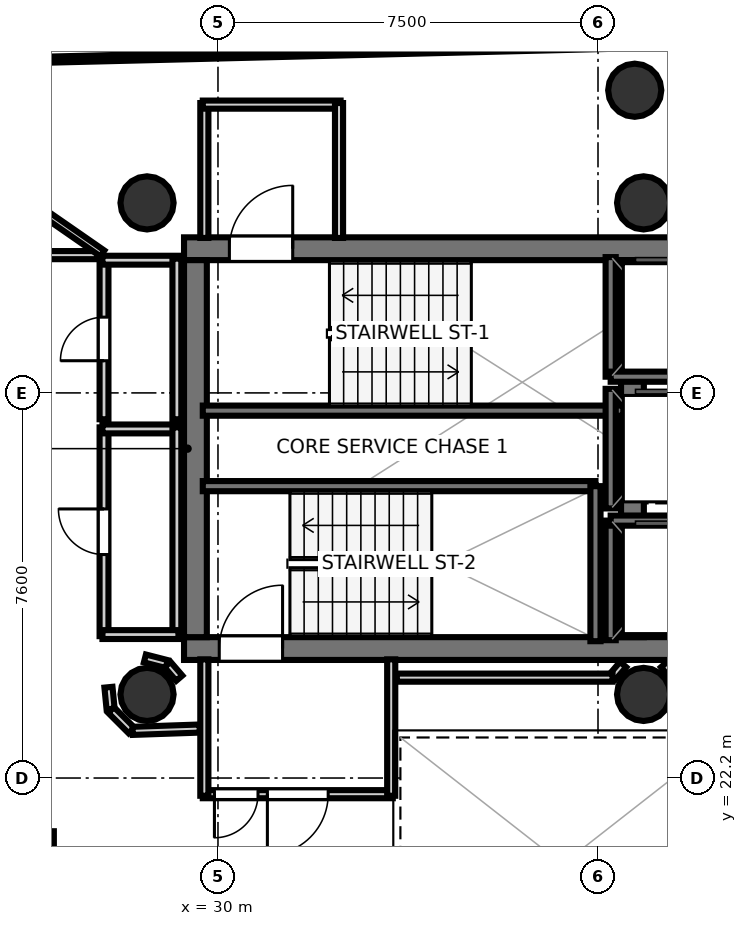
"""IFC4 building model, lengths in metres.
Left out: names, types, materials, properties, quantities, classifications, styles, units other than length and angle.
Written with IfcOpenShell. Run it as: python <this file> out.ifc"""

import sys

from ifc_helpers import new_model, si_unit, direction, frame, frame_2d, origin, origin_2d, place, context, subcontext, project, spatial, rectangle, hollow_circle, extrude, element, fill, save


model = new_model("IFC4")
c1 = context("Model", 3, precision=1e-05, world=origin(), true_north=direction((0.0, 1.0)))
c2 = subcontext(c1, "Body", "Model", "MODEL_VIEW")
j1 = project(units=[si_unit("LENGTHUNIT", "METRE"), si_unit("PLANEANGLEUNIT", "RADIAN")], contexts=[c1])
p1 = place(None, origin())
s1 = spatial("IfcSite", under=j1, at=p1, CompositionType="ELEMENT")
p2 = place(p1, origin())
s2 = spatial("IfcBuilding", under=s1, at=p2, CompositionType="ELEMENT")
p3 = place(p2, frame((0.0, 0.0, 257.5)))
s3 = spatial("IfcBuildingStorey", under=s2, at=p3, CompositionType="ELEMENT", Elevation=257.5)
p4 = place(p3, frame((29.33, 32.645, 0.0), z_axis=(0.0, 0.0, 1.0), x_axis=(1.0, 0.0, 0.0)))
e1 = element("IfcWall", 1, at=p4, inside=s3, PredefinedType="SHEAR", context=c2, shape_type="SweptSolid", body=[
    extrude(rectangle(XDim=10.52, YDim=0.45, at=frame_2d((5.26, 0.0))), origin(), (0.0, 0.0, 1.0), 3.52),
])
p5 = place(p4, frame((0.895, 0.0, 0.0)))
e2 = element("IfcOpeningElement", 2, at=p5, cuts=e1, PredefinedType="OPENING", context=c2, shape_type="SweptSolid", body=[
    extrude(rectangle(XDim=1.25, YDim=2.15, at=frame_2d((0.625, 1.075))), frame((0.0, 0.235, 0.0), z_axis=(0.0, -1.0, 0.0), x_axis=(1.0, 0.0, 0.0)), (0.0, 0.0, 1.0), 0.47),
])
p6 = place(p3, frame((29.33, 24.755, 0.0), z_axis=(0.0, 0.0, 1.0), x_axis=(1.0, 0.0, 0.0)))
e3 = element("IfcWall", 3, at=p6, inside=s3, PredefinedType="SHEAR", context=c2, shape_type="SweptSolid", body=[
    extrude(rectangle(XDim=10.52, YDim=0.45, at=frame_2d((5.26, 0.0))), origin(), (0.0, 0.0, 1.0), 3.52),
])
p7 = place(p6, frame((0.695, 0.0, 0.0)))
e4 = element("IfcOpeningElement", 4, at=p7, cuts=e3, PredefinedType="OPENING", context=c2, shape_type="SweptSolid", body=[
    extrude(rectangle(XDim=1.25, YDim=2.15, at=frame_2d((0.625, 1.075))), frame((0.0, 0.235, 0.0), z_axis=(0.0, -1.0, 0.0), x_axis=(1.0, 0.0, 0.0)), (0.0, 0.0, 1.0), 0.47),
])
for number, where, z_axis, x_axis in (
    (5, (29.555, 24.98, 0.0), (0.0, 0.0, 1.0), (0.0, 1.0, 0.0)),
    (6, (38.18, 24.98, 0.0), (0.0, 0.0, 1.0), (0.0, 1.0, 0.0)),
):
    element("IfcWall", number, at=place(p3, frame(where, z_axis=z_axis, x_axis=x_axis)), inside=s3, PredefinedType="SHEAR", context=c2, shape_type="SweptSolid", body=[
        extrude(rectangle(XDim=7.44, YDim=0.45, at=frame_2d((3.72, 0.0))), origin(), (0.0, 0.0, 1.0), 3.52),
    ])
for number, where, z_axis, x_axis in (
    (7, (28.6, 33.55, 0.0), (0.0, 0.0, 1.0), (1.0, 0.0, 0.0)),
    (8, (28.6, 23.85, 0.0), (0.0, 0.0, 1.0), (1.0, 0.0, 0.0)),
    (9, (38.4, 33.55, 0.0), (0.0, 0.0, 1.0), (1.0, 0.0, 0.0)),
    (10, (38.4, 23.85, 0.0), (0.0, 0.0, 1.0), (1.0, 0.0, 0.0)),
    (11, (38.225, 35.773, 0.0), (0.0, 0.0, 1.0), (1.0, 0.0, 0.0)),
):
    element("IfcColumn", number, at=place(p3, frame(where, z_axis=z_axis, x_axis=x_axis)), inside=s3, PredefinedType="COLUMN", context=c2, shape_type="SweptSolid", body=[
        extrude(hollow_circle(Radius=0.525, WallThickness=0.028, at=origin_2d()), origin(), (0.0, 0.0, 1.0), 3.7),
    ])
p8 = place(p3, frame((29.7, 29.45, 0.0), z_axis=(0.0, 0.0, 1.0), x_axis=(1.0, 0.0, 0.0)))
e12 = element("IfcWall", 12, at=p8, inside=s3, PredefinedType="SOLIDWALL", context=c2, shape_type="SweptSolid", body=[
    extrude(rectangle(XDim=8.3, YDim=0.2, at=frame_2d((4.15, 0.0))), origin(), (0.0, 0.0, 1.0), 3.52),
])
p9 = place(p3, frame((29.7, 27.96, 0.0), z_axis=(0.0, 0.0, 1.0), x_axis=(1.0, 0.0, 0.0)))
e13 = element("IfcWall", 13, at=p9, inside=s3, PredefinedType="SOLIDWALL", context=c2, shape_type="SweptSolid", body=[
    extrude(rectangle(XDim=7.75, YDim=0.2, at=frame_2d((3.875, 0.0))), origin(), (0.0, 0.0, 1.0), 3.52),
])
p10 = place(p3, frame((37.45, 24.9, 0.0), z_axis=(0.0, 0.0, 1.0), x_axis=(0.0, 1.0, 0.0)))
e14 = element("IfcWall", 14, at=p10, inside=s3, PredefinedType="SOLIDWALL", context=c2, shape_type="SweptSolid", body=[
    extrude(rectangle(XDim=3.06, YDim=0.2, at=frame_2d((1.53, 0.0))), origin(), (0.0, 0.0, 1.0), 3.52),
])
p11 = place(p3, frame((37.75, 30.12, 0.0), z_axis=(0.0, 0.0, 1.0), x_axis=(0.0, 1.0, 0.0)))
e15 = element("IfcWall", 15, at=p11, inside=s3, PredefinedType="SOLIDWALL", context=c2, shape_type="SweptSolid", body=[
    extrude(rectangle(XDim=2.36, YDim=0.2, at=frame_2d((1.18, 0.0))), origin(), (0.0, 0.0, 1.0), 3.52),
])
p12 = place(p3, frame((37.75, 30.12, 0.0), z_axis=(0.0, 0.0, 1.0), x_axis=(1.0, 0.0, 0.0)))
e16 = element("IfcWall", 16, at=p12, inside=s3, PredefinedType="SOLIDWALL", context=c2, shape_type="SweptSolid", body=[
    extrude(rectangle(XDim=2.1, YDim=0.2, at=frame_2d((1.05, 0.0))), origin(), (0.0, 0.0, 1.0), 3.52),
])
p13 = place(p3, frame((37.75, 24.92, 0.0), z_axis=(0.0, 0.0, 1.0), x_axis=(0.0, 1.0, 0.0)))
e17 = element("IfcWall", 17, at=p13, inside=s3, PredefinedType="SOLIDWALL", context=c2, shape_type="SweptSolid", body=[
    extrude(rectangle(XDim=2.36, YDim=0.2, at=frame_2d((1.18, 0.0))), origin(), (0.0, 0.0, 1.0), 3.52),
])
p14 = place(p3, frame((37.75, 27.28, 0.0), z_axis=(0.0, 0.0, 1.0), x_axis=(1.0, 0.0, 0.0)))
e18 = element("IfcWall", 18, at=p14, inside=s3, PredefinedType="SOLIDWALL", context=c2, shape_type="SweptSolid", body=[
    extrude(rectangle(XDim=2.1, YDim=0.2, at=frame_2d((1.05, 0.0))), origin(), (0.0, 0.0, 1.0), 3.52),
])
p15 = place(p3, frame((37.75, 27.52, 0.0), z_axis=(0.0, 0.0, 1.0), x_axis=(0.0, 1.0, 0.0)))
e19 = element("IfcWall", 19, at=p15, inside=s3, PredefinedType="SOLIDWALL", context=c2, shape_type="SweptSolid", body=[
    extrude(rectangle(XDim=2.36, YDim=0.2, at=frame_2d((1.18, 0.0))), origin(), (0.0, 0.0, 1.0), 3.52),
])
p16 = place(p3, frame((29.731, 32.858, 0.0), z_axis=(0.0, 0.0, 1.0), x_axis=(0.0, 1.0, 0.0)))
e20 = element("IfcWall", 20, at=p16, inside=s3, PredefinedType="PARTITIONING", context=c2, shape_type="SweptSolid", body=[
    extrude(rectangle(XDim=2.662, YDim=0.16, at=frame_2d((1.331, 0.0))), origin(), (0.0, 0.0, 1.0), 2.84),
])
p17 = place(p3, frame((29.7, 35.489, 0.0), z_axis=(0.0, 0.0, 1.0), x_axis=(1.0, 0.0, 0.0)))
e21 = element("IfcWall", 21, at=p17, inside=s3, PredefinedType="PARTITIONING", context=c2, shape_type="SweptSolid", body=[
    extrude(rectangle(XDim=2.72, YDim=0.16, at=frame_2d((1.36, 0.0))), origin(), (0.0, 0.0, 1.0), 2.84),
])
p18 = place(p3, frame((32.389, 35.52, 0.0), z_axis=(0.0, 0.0, 1.0), x_axis=(0.0, -1.0, 0.0)))
e22 = element("IfcWall", 22, at=p18, inside=s3, PredefinedType="PARTITIONING", context=c2, shape_type="SweptSolid", body=[
    extrude(rectangle(XDim=2.662, YDim=0.16, at=frame_2d((1.331, 0.0))), origin(), (0.0, 0.0, 1.0), 2.84),
])
p19 = place(p3, frame((33.45, 21.881, 0.0), z_axis=(0.0, 0.0, 1.0), x_axis=(-1.0, 0.0, 0.0)))
e23 = element("IfcWall", 23, at=p19, inside=s3, PredefinedType="PARTITIONING", context=c2, shape_type="SweptSolid", body=[
    extrude(rectangle(XDim=3.75, YDim=0.16, at=frame_2d((1.875, 0.0))), origin(), (0.0, 0.0, 1.0), 2.84),
])
p20 = place(p19, frame((1.275, 0.0, 0.0)))
e24 = element("IfcOpeningElement", 24, at=p20, cuts=e23, PredefinedType="OPENING", context=c2, shape_type="SweptSolid", body=[
    extrude(rectangle(XDim=1.2, YDim=2.15, at=frame_2d((0.6, 1.075))), frame((0.0, 0.09, 0.0), z_axis=(0.0, -1.0, 0.0), x_axis=(1.0, 0.0, 0.0)), (0.0, 0.0, 1.0), 0.18),
])
p21 = place(p19, frame((2.66, 0.0, 0.0)))
e25 = element("IfcOpeningElement", 25, at=p21, cuts=e23, PredefinedType="OPENING", context=c2, shape_type="SweptSolid", body=[
    extrude(rectangle(XDim=0.86, YDim=2.05, at=frame_2d((0.43, 1.025))), frame((0.0, 0.09, 0.0), z_axis=(0.0, -1.0, 0.0), x_axis=(1.0, 0.0, 0.0)), (0.0, 0.0, 1.0), 0.18),
])
for number, where, z_axis, x_axis in (
    (26, (29.731, 21.85, 0.0), (0.0, 0.0, 1.0), (0.0, 1.0, 0.0)),
    (27, (33.419, 24.542, 0.0), (0.0, 0.0, 1.0), (0.0, -1.0, 0.0)),
):
    element("IfcWall", number, at=place(p3, frame(where, z_axis=z_axis, x_axis=x_axis)), inside=s3, PredefinedType="PARTITIONING", context=c2, shape_type="SweptSolid", body=[
        extrude(rectangle(XDim=2.692, YDim=0.16, at=frame_2d((1.346, 0.0))), origin(), (0.0, 0.0, 1.0), 2.84),
    ])
p22 = place(p3, frame((27.751, 25.0, 0.0), z_axis=(0.0, 0.0, 1.0), x_axis=(0.0, 1.0, 0.0)))
e28 = element("IfcWall", 28, at=p22, inside=s3, PredefinedType="PLUMBINGWALL", context=c2, shape_type="SweptSolid", body=[
    extrude(rectangle(XDim=4.12, YDim=0.175, at=frame_2d((2.06, 0.0))), origin(), (0.0, 0.0, 1.0), 2.84),
])
p23 = place(p22, frame((1.61, 0.0, 0.0)))
e29 = element("IfcOpeningElement", 29, at=p23, cuts=e28, PredefinedType="OPENING", context=c2, shape_type="SweptSolid", body=[
    extrude(rectangle(XDim=0.9, YDim=2.1, at=frame_2d((0.45, 1.05))), frame((0.0, 0.097, 0.0), z_axis=(0.0, -1.0, 0.0), x_axis=(1.0, 0.0, 0.0)), (0.0, 0.0, 1.0), 0.195),
])
p24 = place(p3, frame((27.72, 29.089, 0.0), z_axis=(0.0, 0.0, 1.0), x_axis=(1.0, 0.0, 0.0)))
e30 = element("IfcWall", 30, at=p24, inside=s3, PredefinedType="PLUMBINGWALL", context=c2, shape_type="SweptSolid", body=[
    extrude(rectangle(XDim=1.5, YDim=0.175, at=frame_2d((0.75, 0.0))), origin(), (0.0, 0.0, 1.0), 2.84),
])
p25 = place(p3, frame((29.189, 29.12, 0.0), z_axis=(0.0, 0.0, 1.0), x_axis=(0.0, -1.0, 0.0)))
e31 = element("IfcWall", 31, at=p25, inside=s3, PredefinedType="PLUMBINGWALL", context=c2, shape_type="SweptSolid", body=[
    extrude(rectangle(XDim=4.12, YDim=0.175, at=frame_2d((2.06, 0.0))), origin(), (0.0, 0.0, 1.0), 2.84),
])
p26 = place(p3, frame((29.22, 25.031, 0.0), z_axis=(0.0, 0.0, 1.0), x_axis=(-1.0, 0.0, 0.0)))
e32 = element("IfcWall", 32, at=p26, inside=s3, PredefinedType="PLUMBINGWALL", context=c2, shape_type="SweptSolid", body=[
    extrude(rectangle(XDim=1.5, YDim=0.175, at=frame_2d((0.75, 0.0))), origin(), (0.0, 0.0, 1.0), 2.84),
])
p27 = place(p3, frame((27.751, 29.28, 0.0), z_axis=(0.0, 0.0, 1.0), x_axis=(0.0, 1.0, 0.0)))
e33 = element("IfcWall", 33, at=p27, inside=s3, PredefinedType="PLUMBINGWALL", context=c2, shape_type="SweptSolid", body=[
    extrude(rectangle(XDim=3.17, YDim=0.175, at=frame_2d((1.585, 0.0))), origin(), (0.0, 0.0, 1.0), 2.84),
])
p28 = place(p27, frame((1.155, 0.0, 0.0)))
e34 = element("IfcOpeningElement", 34, at=p28, cuts=e33, PredefinedType="OPENING", context=c2, shape_type="SweptSolid", body=[
    extrude(rectangle(XDim=0.86, YDim=2.05, at=frame_2d((0.43, 1.025))), frame((0.0, 0.097, 0.0), z_axis=(0.0, -1.0, 0.0), x_axis=(1.0, 0.0, 0.0)), (0.0, 0.0, 1.0), 0.195),
])
p29 = place(p3, frame((27.72, 32.419, 0.0), z_axis=(0.0, 0.0, 1.0), x_axis=(1.0, 0.0, 0.0)))
e35 = element("IfcWall", 35, at=p29, inside=s3, PredefinedType="PLUMBINGWALL", context=c2, shape_type="SweptSolid", body=[
    extrude(rectangle(XDim=1.5, YDim=0.175, at=frame_2d((0.75, 0.0))), origin(), (0.0, 0.0, 1.0), 2.84),
])
p30 = place(p3, frame((29.189, 32.45, 0.0), z_axis=(0.0, 0.0, 1.0), x_axis=(0.0, -1.0, 0.0)))
e36 = element("IfcWall", 36, at=p30, inside=s3, PredefinedType="PLUMBINGWALL", context=c2, shape_type="SweptSolid", body=[
    extrude(rectangle(XDim=3.17, YDim=0.175, at=frame_2d((1.585, 0.0))), origin(), (0.0, 0.0, 1.0), 2.84),
])
p31 = place(p3, frame((29.236, 24.17, 0.0), z_axis=(0.0, 0.0, 1.0), x_axis=(-0.652260263346, 0.757995084984, 0.0)))
e37 = element("IfcWall", 37, at=p31, inside=s3, PredefinedType="PARTITIONING", context=c2, shape_type="SweptSolid", body=[
    extrude(rectangle(XDim=0.355, YDim=0.16, at=frame_2d((0.178, 0.0))), origin(), (0.0, 0.0, 1.0), 2.84),
])
p32 = place(p3, frame((28.988, 24.45, 0.0), z_axis=(0.0, 0.0, 1.0), x_axis=(-0.968704505916, 0.248216800836, 0.0)))
e38 = element("IfcWall", 38, at=p32, inside=s3, PredefinedType="PARTITIONING", context=c2, shape_type="SweptSolid", body=[
    extrude(rectangle(XDim=0.445, YDim=0.16, at=frame_2d((0.222, 0.0))), origin(), (0.0, 0.0, 1.0), 2.84),
])
p33 = place(p3, frame((39.036, 24.17, 0.0), z_axis=(0.0, 0.0, 1.0), x_axis=(-0.652260263346, 0.757995084984, 0.0)))
e39 = element("IfcWall", 39, at=p33, inside=s3, PredefinedType="PARTITIONING", context=c2, shape_type="SweptSolid", body=[
    extrude(rectangle(XDim=0.355, YDim=0.16, at=frame_2d((0.178, 0.0))), origin(), (0.0, 0.0, 1.0), 2.84),
])
p34 = place(p3, frame((37.996, 24.44, 0.0), z_axis=(0.0, 0.0, 1.0), x_axis=(-0.652425645794, -0.757852740782, 0.0)))
e40 = element("IfcWall", 40, at=p34, inside=s3, PredefinedType="PARTITIONING", context=c2, shape_type="SweptSolid", body=[
    extrude(rectangle(XDim=0.32, YDim=0.16, at=frame_2d((0.16, 0.0))), origin(), (0.0, 0.0, 1.0), 2.84),
])
p35 = place(p3, frame((37.787, 24.181, 0.0), z_axis=(0.0, 0.0, 1.0), x_axis=(-1.0, 0.0, 0.0)))
e41 = element("IfcWall", 41, at=p35, inside=s3, PredefinedType="PARTITIONING", context=c2, shape_type="SweptSolid", body=[
    extrude(rectangle(XDim=4.257, YDim=0.16, at=frame_2d((2.129, 0.0))), origin(), (0.0, 0.0, 1.0), 2.84),
])
p36 = place(p3, frame((27.838, 23.992, 0.0), z_axis=(0.0, 0.0, 1.0), x_axis=(0.098273407977, -0.995159453196, 0.0)))
e42 = element("IfcWall", 42, at=p36, inside=s3, PredefinedType="PARTITIONING", context=c2, shape_type="SweptSolid", body=[
    extrude(rectangle(XDim=0.432, YDim=0.16, at=frame_2d((0.216, 0.0))), origin(), (0.0, 0.0, 1.0), 2.84),
])
p37 = place(p3, frame((27.89, 23.543, 0.0), z_axis=(0.0, 0.0, 1.0), x_axis=(0.707106781187, -0.707106781187, 0.0)))
e43 = element("IfcWall", 43, at=p37, inside=s3, PredefinedType="PARTITIONING", context=c2, shape_type="SweptSolid", body=[
    extrude(rectangle(XDim=0.57, YDim=0.16, at=frame_2d((0.285, 0.0))), origin(), (0.0, 0.0, 1.0), 2.84),
])
p38 = place(p3, frame((28.316, 23.131, 0.0), z_axis=(0.0, 0.0, 1.0), x_axis=(0.999405342193, 0.034481328227, 0.0)))
e44 = element("IfcWall", 44, at=p38, inside=s3, PredefinedType="PARTITIONING", context=c2, shape_type="SweptSolid", body=[
    extrude(rectangle(XDim=1.324, YDim=0.16, at=frame_2d((0.662, 0.0))), origin(), (0.0, 0.0, 1.0), 2.84),
])
p39 = place(p3, frame((26.681, 17.95, 0.0), z_axis=(0.0, 0.0, 1.0), x_axis=(0.0, 1.0, 0.0)))
e45 = element("IfcWall", 45, at=p39, inside=s3, PredefinedType="PARTITIONING", context=c2, shape_type="SweptSolid", body=[
    extrude(rectangle(XDim=3.2, YDim=0.16, at=frame_2d((1.6, 0.0))), origin(), (0.0, 0.0, 1.0), 2.84),
])
p40 = place(p3, frame((25.25, 32.519, 0.0), z_axis=(0.0, 0.0, 1.0), x_axis=(1.0, 0.0, 0.0)))
e46 = element("IfcWall", 46, at=p40, inside=s3, PredefinedType="PARTITIONING", context=c2, shape_type="SweptSolid", body=[
    extrude(rectangle(XDim=2.37, YDim=0.16, at=frame_2d((1.185, 0.0))), origin(), (0.0, 0.0, 1.0), 2.84),
])
p41 = place(p3, frame((26.961, 15.871, 0.0), z_axis=(0.0, 0.0, 1.0), x_axis=(-0.434614939442, 0.90061637472, 0.0)))
e47 = element("IfcWall", 47, at=p41, inside=s3, PredefinedType="PARTITIONING", context=c2, shape_type="SweptSolid", body=[
    extrude(rectangle(XDim=12.064, YDim=0.14, at=frame_2d((6.032, 0.0))), origin(), (0.0, 0.0, 1.0), 2.84),
])
p42 = place(p3, frame((27.718, 32.553, 0.0), z_axis=(0.0, 0.0, 1.0), x_axis=(-0.821796079358, 0.569781716056, 0.0)))
e48 = element("IfcWall", 48, at=p42, inside=s3, PredefinedType="PARTITIONING", context=c2, shape_type="SweptSolid", body=[
    extrude(rectangle(XDim=7.348, YDim=0.14, at=frame_2d((3.674, 0.0))), origin(), (0.0, 0.0, 1.0), 2.84),
])
p43 = place(p3, frame((21.365, 36.247, 0.0), z_axis=(0.0, 0.0, 1.0), x_axis=(0.999698298545, 0.024562407988, 0.0)))
e49 = element("IfcWall", 49, at=p43, inside=s3, PredefinedType="PARTITIONING", context=c2, shape_type="SweptSolid", body=[
    extrude(rectangle(XDim=35.325, YDim=0.12, at=frame_2d((17.663, 0.0))), origin(), (0.0, 0.0, 1.0), 2.84),
])
p44 = place(p5, origin())
e50 = element("IfcDoor", 50, at=p44, inside=s3, OperationType="SINGLE_SWING_RIGHT", PredefinedType="DOOR", context=c2, shape_type="SweptSolid", body=[
    extrude(rectangle(XDim=1.25, YDim=2.15, at=frame_2d((0.625, 1.075))), frame((0.0, 0.025, 0.0), z_axis=(0.0, -1.0, 0.0), x_axis=(1.0, 0.0, 0.0)), (0.0, 0.0, 1.0), 0.05),
])
fill(e2, e50)
p45 = place(p7, origin())
e51 = element("IfcDoor", 51, at=p45, inside=s3, OperationType="SINGLE_SWING_RIGHT", PredefinedType="DOOR", context=c2, shape_type="SweptSolid", body=[
    extrude(rectangle(XDim=1.25, YDim=2.15, at=frame_2d((0.625, 1.075))), frame((0.0, 0.025, 0.0), z_axis=(0.0, -1.0, 0.0), x_axis=(1.0, 0.0, 0.0)), (0.0, 0.0, 1.0), 0.05),
])
fill(e4, e51)
p46 = place(p20, origin())
e52 = element("IfcDoor", 52, at=p46, inside=s3, OperationType="SINGLE_SWING_RIGHT", PredefinedType="DOOR", context=c2, shape_type="SweptSolid", body=[
    extrude(rectangle(XDim=1.2, YDim=2.15, at=frame_2d((0.6, 1.075))), frame((0.0, 0.025, 0.0), z_axis=(0.0, -1.0, 0.0), x_axis=(1.0, 0.0, 0.0)), (0.0, 0.0, 1.0), 0.05),
])
fill(e24, e52)
p47 = place(p23, origin())
e53 = element("IfcDoor", 53, at=p47, inside=s3, OperationType="SINGLE_SWING_RIGHT", PredefinedType="DOOR", context=c2, shape_type="SweptSolid", body=[
    extrude(rectangle(XDim=0.9, YDim=2.1, at=frame_2d((0.45, 1.05))), frame((0.0, 0.025, 0.0), z_axis=(0.0, -1.0, 0.0), x_axis=(1.0, 0.0, 0.0)), (0.0, 0.0, 1.0), 0.05),
])
fill(e29, e53)
p48 = place(p28, origin())
e54 = element("IfcDoor", 54, at=p48, inside=s3, OperationType="SINGLE_SWING_LEFT", PredefinedType="DOOR", context=c2, shape_type="SweptSolid", body=[
    extrude(rectangle(XDim=0.86, YDim=2.05, at=frame_2d((0.43, 1.025))), frame((0.0, 0.025, 0.0), z_axis=(0.0, -1.0, 0.0), x_axis=(1.0, 0.0, 0.0)), (0.0, 0.0, 1.0), 0.05),
])
fill(e34, e54)
p49 = place(p21, origin())
e55 = element("IfcDoor", 55, at=p49, inside=s3, OperationType="SINGLE_SWING_RIGHT", PredefinedType="DOOR", context=c2, shape_type="SweptSolid", body=[
    extrude(rectangle(XDim=0.86, YDim=2.05, at=frame_2d((0.43, 1.025))), frame((0.0, 0.025, 0.0), z_axis=(0.0, -1.0, 0.0), x_axis=(1.0, 0.0, 0.0)), (0.0, 0.0, 1.0), 0.05),
])
fill(e25, e55)
save(model, sys.argv[1])
